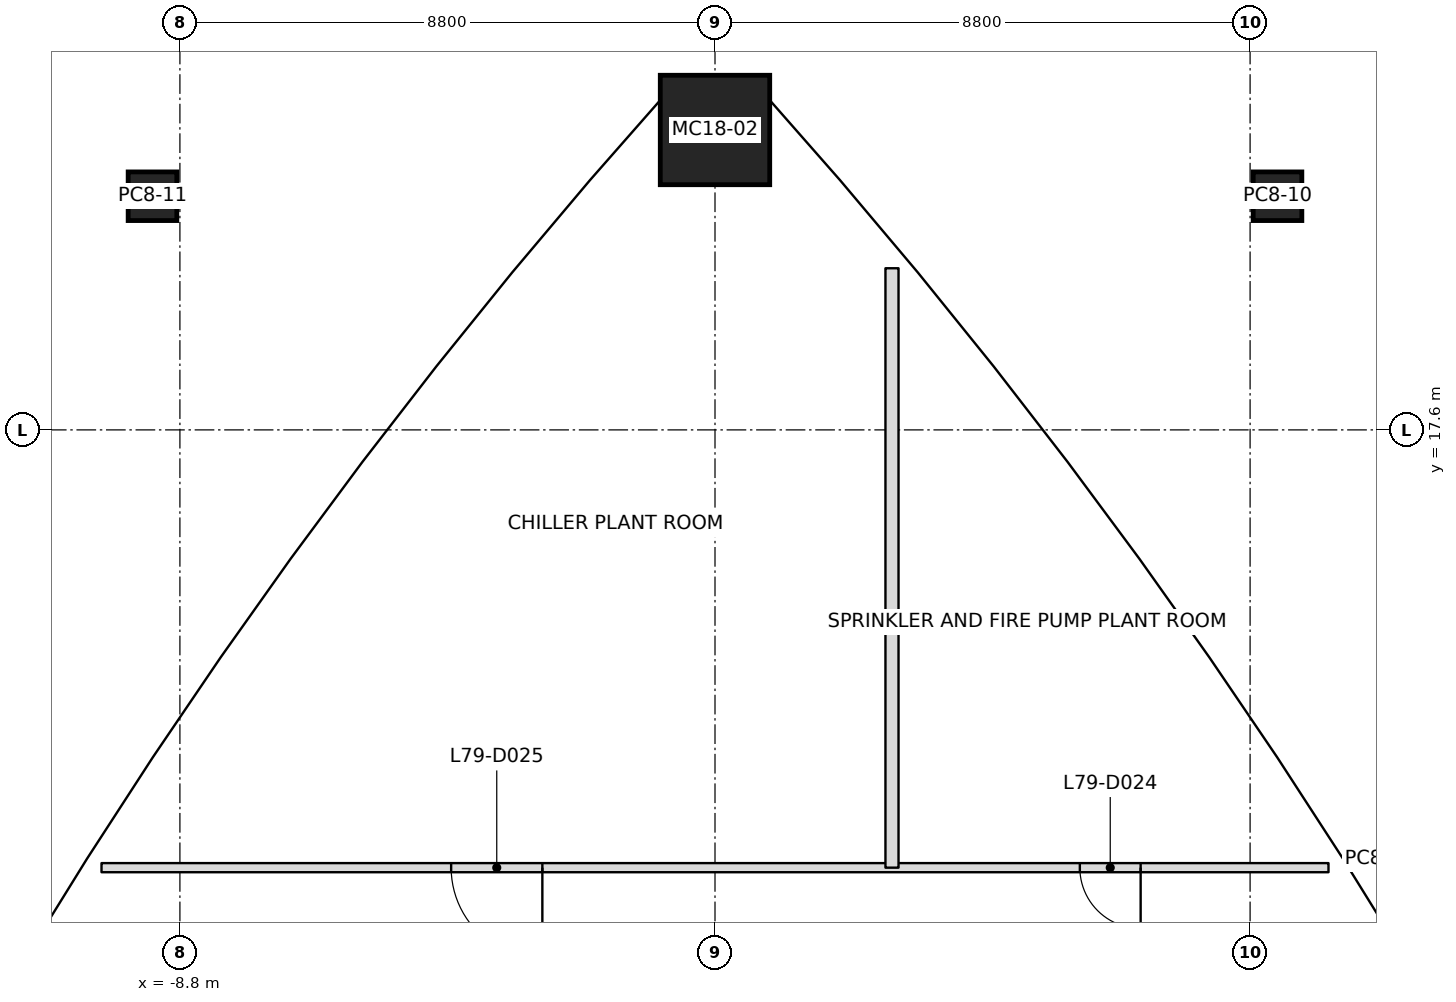
"""IFC4 building model, lengths in metres.
Left out: names, types, materials, properties, quantities, classifications, styles, units other than length and angle.
Written with IfcOpenShell. Run it as: python <this file> out.ifc"""

import sys

from ifc_helpers import new_model, si_unit, direction, frame, frame_2d, origin, origin_2d, place, context, subcontext, project, spatial, rectangle, extrude, element, fill, save


model = new_model("IFC4")
c1 = context("Model", 3, precision=1e-05, world=origin(), true_north=direction((0.0, 1.0)))
c2 = subcontext(c1, "Body", "Model", "MODEL_VIEW")
j1 = project(units=[si_unit("LENGTHUNIT", "METRE"), si_unit("PLANEANGLEUNIT", "RADIAN")], contexts=[c1])
p1 = place(None, origin())
s1 = spatial("IfcSite", under=j1, at=p1, CompositionType="ELEMENT")
p2 = place(p1, origin())
s2 = spatial("IfcBuilding", under=s1, at=p2, CompositionType="ELEMENT")
p3 = place(p2, frame((0.0, 0.0, 355.6)))
s3 = spatial("IfcBuildingStorey", under=s2, at=p3, CompositionType="ELEMENT", Elevation=355.6)
p4 = place(p3, frame((0.0, 22.532, 0.0), z_axis=(0.0, 0.0, 1.0), x_axis=(1.0, 0.0, 0.0)))
e1 = element("IfcColumn", 1, at=p4, inside=s3, PredefinedType="COLUMN", context=c2, shape_type="SweptSolid", body=[
    extrude(rectangle(XDim=1.8, YDim=1.8, at=origin_2d()), origin(), (0.0, 0.0, 1.0), 5.4),
])
for number, where, z_axis, x_axis in (
    (2, (9.251, 21.443, 0.0), (0.0, 0.0, 1.0), (-0.615, 0.789, 0.0)),
    (3, (-9.251, 21.443, 0.0), (0.0, 0.0, 1.0), (0.615, 0.789, 0.0)),
):
    element("IfcColumn", number, at=place(p3, frame(where, z_axis=z_axis, x_axis=x_axis)), inside=s3, PredefinedType="COLUMN", context=c2, shape_type="SweptSolid", body=[
        extrude(rectangle(XDim=0.8, YDim=0.8, at=origin_2d()), origin(), (0.0, 0.0, 1.0), 5.4),
    ])
p5 = place(p3, frame((2.911, 10.4, 0.0), z_axis=(0.0, 0.0, 1.0), x_axis=(0.0, 1.0, 0.0)))
e4 = element("IfcWall", 4, at=p5, inside=s3, PredefinedType="PARTITIONING", context=c2, shape_type="SweptSolid", body=[
    extrude(rectangle(XDim=9.859, YDim=0.215, at=frame_2d((4.929, 0.0))), origin(), (0.0, 0.0, 1.0), 4.497),
])
p6 = place(p3, frame((10.089, 10.4, 0.0), z_axis=(0.0, 0.0, 1.0), x_axis=(-1.0, 0.0, 0.0)))
e5 = element("IfcWall", 5, at=p6, inside=s3, PredefinedType="PARTITIONING", context=c2, shape_type="SweptSolid", body=[
    extrude(rectangle(XDim=20.179, YDim=0.15, at=frame_2d((10.089, 0.0))), origin(), (0.0, 0.0, 1.0), 4.497),
])
p7 = place(p6, frame((3.089, 0.0, 0.0)))
e6 = element("IfcOpeningElement", 6, at=p7, cuts=e5, PredefinedType="OPENING", context=c2, shape_type="SweptSolid", body=[
    extrude(rectangle(XDim=1.0, YDim=2.4, at=frame_2d((0.5, 1.2))), frame((0.0, 0.075, 0.0), z_axis=(0.0, -1.0, 0.0), x_axis=(1.0, 0.0, 0.0)), (0.0, 0.0, 1.0), 0.15),
])
p8 = place(p6, frame((12.929, 0.0, 0.0)))
e7 = element("IfcOpeningElement", 7, at=p8, cuts=e5, PredefinedType="OPENING", context=c2, shape_type="SweptSolid", body=[
    extrude(rectangle(XDim=1.5, YDim=2.4, at=frame_2d((0.75, 1.2))), frame((0.0, 0.075, 0.0), z_axis=(0.0, -1.0, 0.0), x_axis=(1.0, 0.0, 0.0)), (0.0, 0.0, 1.0), 0.15),
])
p9 = place(p7, origin())
e8 = element("IfcDoor", 8, at=p9, inside=s3, OperationType="SINGLE_SWING_RIGHT", PredefinedType="DOOR", context=c2, shape_type="SweptSolid", body=[
    extrude(rectangle(XDim=1.0, YDim=2.4, at=frame_2d((0.5, 1.2))), frame((0.0, 0.025, 0.0), z_axis=(0.0, -1.0, 0.0), x_axis=(1.0, 0.0, 0.0)), (0.0, 0.0, 1.0), 0.05),
])
fill(e6, e8)
p10 = place(p8, origin())
e9 = element("IfcDoor", 9, at=p10, inside=s3, OperationType="DOUBLE_DOOR_SINGLE_SWING", PredefinedType="DOOR", context=c2, shape_type="SweptSolid", body=[
    extrude(rectangle(XDim=1.5, YDim=2.4, at=frame_2d((0.75, 1.2))), frame((0.0, 0.025, 0.0), z_axis=(0.0, -1.0, 0.0), x_axis=(1.0, 0.0, 0.0)), (0.0, 0.0, 1.0), 0.05),
])
fill(e7, e9)
save(model, sys.argv[1])
